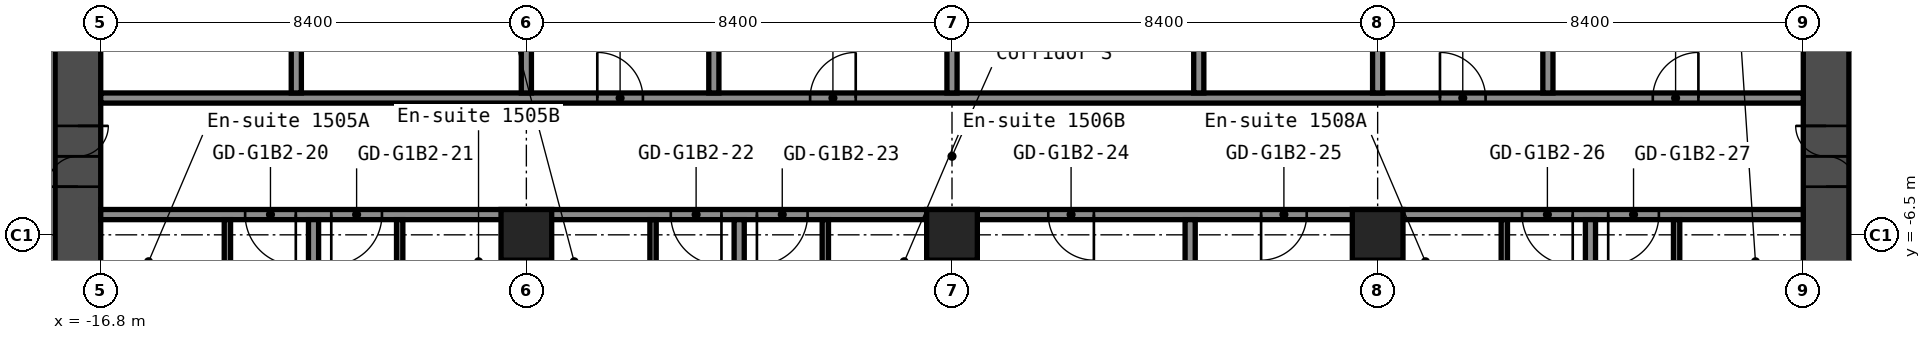
"""IFC4 building model, lengths in metres.
Left out: names, types, materials, properties, quantities, classifications, styles, units other than length and angle.
Written with IfcOpenShell. Run it as: python <this file> out.ifc"""

import sys

from ifc_helpers import new_model, si_unit, direction, frame, frame_2d, origin, origin_2d, place, context, subcontext, project, spatial, rectangle, hollow_rectangle, extrude, element, fill, save


model = new_model("IFC4")
c1 = context("Model", 3, precision=1e-05, world=origin(), true_north=direction((0.0, 1.0)))
c2 = subcontext(c1, "Body", "Model", "MODEL_VIEW")
j1 = project(units=[si_unit("LENGTHUNIT", "METRE"), si_unit("PLANEANGLEUNIT", "RADIAN")], contexts=[c1])
p1 = place(None, origin())
s1 = spatial("IfcSite", under=j1, at=p1, CompositionType="ELEMENT")
p2 = place(p1, origin())
s2 = spatial("IfcBuilding", under=s1, at=p2, CompositionType="ELEMENT")
p3 = place(p2, frame((0.0, 0.0, 55.0)))
s3 = spatial("IfcBuildingStorey", under=s2, at=p3, CompositionType="ELEMENT", Elevation=55.0)
for number, where, z_axis, x_axis in (
    (1, (-8.4, -6.5, 0.0), (0.0, 0.0, 1.0), (1.0, 0.0, 0.0)),
    (2, (0.0, -6.5, 0.0), (0.0, 0.0, 1.0), (1.0, 0.0, 0.0)),
    (3, (8.4, -6.5, 0.0), (0.0, 0.0, 1.0), (1.0, 0.0, 0.0)),
):
    element("IfcColumn", number, at=place(p3, frame(where, z_axis=z_axis, x_axis=x_axis)), inside=s3, PredefinedType="COLUMN", context=c2, shape_type="SweptSolid", body=[
        extrude(hollow_rectangle(XDim=1.0, YDim=1.0, WallThickness=0.04, at=origin_2d()), origin(), (0.0, 0.0, 1.0), 2.8),
    ])
p4 = place(p3, frame((-17.25, -8.4, 0.0), z_axis=(0.0, 0.0, 1.0), x_axis=(0.0, 1.0, 0.0)))
e4 = element("IfcWall", 4, at=p4, inside=s3, PredefinedType="SHEAR", context=c2, shape_type="SweptSolid", body=[
    extrude(rectangle(XDim=16.8, YDim=0.9, at=frame_2d((8.4, 0.0))), origin(), (0.0, 0.0, 1.0), 2.8),
])
p5 = place(p4, frame((12.75, 0.0, 0.0)))
e5 = element("IfcOpeningElement", 5, at=p5, cuts=e4, PredefinedType="OPENING", context=c2, shape_type="SweptSolid", body=[
    extrude(rectangle(XDim=1.2, YDim=2.1, at=frame_2d((0.6, 1.05))), frame((0.0, 0.46, 0.0), z_axis=(0.0, -1.0, 0.0), x_axis=(1.0, 0.0, 0.0)), (0.0, 0.0, 1.0), 0.92),
])
p6 = place(p4, frame((2.85, 0.0, 0.0)))
e6 = element("IfcOpeningElement", 6, at=p6, cuts=e4, PredefinedType="OPENING", context=c2, shape_type="SweptSolid", body=[
    extrude(rectangle(XDim=1.2, YDim=2.1, at=frame_2d((0.6, 1.05))), frame((0.0, 0.46, 0.0), z_axis=(0.0, -1.0, 0.0), x_axis=(1.0, 0.0, 0.0)), (0.0, 0.0, 1.0), 0.92),
])
p7 = place(p3, frame((17.25, -8.4, 0.0), z_axis=(0.0, 0.0, 1.0), x_axis=(0.0, 1.0, 0.0)))
e7 = element("IfcWall", 7, at=p7, inside=s3, PredefinedType="SHEAR", context=c2, shape_type="SweptSolid", body=[
    extrude(rectangle(XDim=16.8, YDim=0.9, at=frame_2d((8.4, 0.0))), origin(), (0.0, 0.0, 1.0), 2.8),
])
p8 = place(p7, frame((12.75, 0.0, 0.0)))
e8 = element("IfcOpeningElement", 8, at=p8, cuts=e7, PredefinedType="OPENING", context=c2, shape_type="SweptSolid", body=[
    extrude(rectangle(XDim=1.2, YDim=2.1, at=frame_2d((0.6, 1.05))), frame((0.0, 0.46, 0.0), z_axis=(0.0, -1.0, 0.0), x_axis=(1.0, 0.0, 0.0)), (0.0, 0.0, 1.0), 0.92),
])
p9 = place(p7, frame((2.85, 0.0, 0.0)))
e9 = element("IfcOpeningElement", 9, at=p9, cuts=e7, PredefinedType="OPENING", context=c2, shape_type="SweptSolid", body=[
    extrude(rectangle(XDim=1.2, YDim=2.1, at=frame_2d((0.6, 1.05))), frame((0.0, 0.46, 0.0), z_axis=(0.0, -1.0, 0.0), x_axis=(1.0, 0.0, 0.0)), (0.0, 0.0, 1.0), 0.92),
])
p10 = place(p3, frame((-16.8, -6.1, 0.0), z_axis=(0.0, 0.0, 1.0), x_axis=(1.0, 0.0, 0.0)))
e10 = element("IfcWall", 10, at=p10, inside=s3, PredefinedType="PARTITIONING", context=c2, shape_type="SweptSolid", body=[
    extrude(rectangle(XDim=33.6, YDim=0.2, at=frame_2d((16.8, 0.0))), origin(), (0.0, 0.0, 1.0), 2.8),
])
p11 = place(p10, frame((2.85, 0.0, 0.0)))
e11 = element("IfcOpeningElement", 11, at=p11, cuts=e10, PredefinedType="OPENING", context=c2, shape_type="SweptSolid", body=[
    extrude(rectangle(XDim=1.0, YDim=2.1, at=frame_2d((0.5, 1.05))), frame((0.0, 0.11, 0.0), z_axis=(0.0, -1.0, 0.0), x_axis=(1.0, 0.0, 0.0)), (0.0, 0.0, 1.0), 0.22),
])
p12 = place(p10, frame((4.55, 0.0, 0.0)))
e12 = element("IfcOpeningElement", 12, at=p12, cuts=e10, PredefinedType="OPENING", context=c2, shape_type="SweptSolid", body=[
    extrude(rectangle(XDim=1.0, YDim=2.1, at=frame_2d((0.5, 1.05))), frame((0.0, 0.11, 0.0), z_axis=(0.0, -1.0, 0.0), x_axis=(1.0, 0.0, 0.0)), (0.0, 0.0, 1.0), 0.22),
])
p13 = place(p10, frame((11.25, 0.0, 0.0)))
e13 = element("IfcOpeningElement", 13, at=p13, cuts=e10, PredefinedType="OPENING", context=c2, shape_type="SweptSolid", body=[
    extrude(rectangle(XDim=1.0, YDim=2.1, at=frame_2d((0.5, 1.05))), frame((0.0, 0.11, 0.0), z_axis=(0.0, -1.0, 0.0), x_axis=(1.0, 0.0, 0.0)), (0.0, 0.0, 1.0), 0.22),
])
p14 = place(p10, frame((12.95, 0.0, 0.0)))
e14 = element("IfcOpeningElement", 14, at=p14, cuts=e10, PredefinedType="OPENING", context=c2, shape_type="SweptSolid", body=[
    extrude(rectangle(XDim=1.0, YDim=2.1, at=frame_2d((0.5, 1.05))), frame((0.0, 0.11, 0.0), z_axis=(0.0, -1.0, 0.0), x_axis=(1.0, 0.0, 0.0)), (0.0, 0.0, 1.0), 0.22),
])
p15 = place(p10, frame((18.7, 0.0, 0.0)))
e15 = element("IfcOpeningElement", 15, at=p15, cuts=e10, PredefinedType="OPENING", context=c2, shape_type="SweptSolid", body=[
    extrude(rectangle(XDim=0.9, YDim=2.1, at=frame_2d((0.45, 1.05))), frame((0.0, 0.11, 0.0), z_axis=(0.0, -1.0, 0.0), x_axis=(1.0, 0.0, 0.0)), (0.0, 0.0, 1.0), 0.22),
])
p16 = place(p10, frame((22.9, 0.0, 0.0)))
e16 = element("IfcOpeningElement", 16, at=p16, cuts=e10, PredefinedType="OPENING", context=c2, shape_type="SweptSolid", body=[
    extrude(rectangle(XDim=0.9, YDim=2.1, at=frame_2d((0.45, 1.05))), frame((0.0, 0.11, 0.0), z_axis=(0.0, -1.0, 0.0), x_axis=(1.0, 0.0, 0.0)), (0.0, 0.0, 1.0), 0.22),
])
p17 = place(p10, frame((28.05, 0.0, 0.0)))
e17 = element("IfcOpeningElement", 17, at=p17, cuts=e10, PredefinedType="OPENING", context=c2, shape_type="SweptSolid", body=[
    extrude(rectangle(XDim=1.0, YDim=2.1, at=frame_2d((0.5, 1.05))), frame((0.0, 0.11, 0.0), z_axis=(0.0, -1.0, 0.0), x_axis=(1.0, 0.0, 0.0)), (0.0, 0.0, 1.0), 0.22),
])
p18 = place(p10, frame((29.75, 0.0, 0.0)))
e18 = element("IfcOpeningElement", 18, at=p18, cuts=e10, PredefinedType="OPENING", context=c2, shape_type="SweptSolid", body=[
    extrude(rectangle(XDim=1.0, YDim=2.1, at=frame_2d((0.5, 1.05))), frame((0.0, 0.11, 0.0), z_axis=(0.0, -1.0, 0.0), x_axis=(1.0, 0.0, 0.0)), (0.0, 0.0, 1.0), 0.22),
])
p19 = place(p3, frame((-16.8, -3.8, 0.0), z_axis=(0.0, 0.0, 1.0), x_axis=(1.0, 0.0, 0.0)))
e19 = element("IfcWall", 19, at=p19, inside=s3, PredefinedType="PARTITIONING", context=c2, shape_type="SweptSolid", body=[
    extrude(rectangle(XDim=33.6, YDim=0.2, at=frame_2d((16.8, 0.0))), origin(), (0.0, 0.0, 1.0), 2.8),
])
p20 = place(p19, frame((9.8, 0.0, 0.0)))
e20 = element("IfcOpeningElement", 20, at=p20, cuts=e19, PredefinedType="OPENING", context=c2, shape_type="SweptSolid", body=[
    extrude(rectangle(XDim=0.9, YDim=2.1, at=frame_2d((0.45, 1.05))), frame((0.0, 0.11, 0.0), z_axis=(0.0, -1.0, 0.0), x_axis=(1.0, 0.0, 0.0)), (0.0, 0.0, 1.0), 0.22),
])
p21 = place(p19, frame((14.0, 0.0, 0.0)))
e21 = element("IfcOpeningElement", 21, at=p21, cuts=e19, PredefinedType="OPENING", context=c2, shape_type="SweptSolid", body=[
    extrude(rectangle(XDim=0.9, YDim=2.1, at=frame_2d((0.45, 1.05))), frame((0.0, 0.11, 0.0), z_axis=(0.0, -1.0, 0.0), x_axis=(1.0, 0.0, 0.0)), (0.0, 0.0, 1.0), 0.22),
])
p22 = place(p19, frame((26.43, 0.0, 0.0)))
e22 = element("IfcOpeningElement", 22, at=p22, cuts=e19, PredefinedType="OPENING", context=c2, shape_type="SweptSolid", body=[
    extrude(rectangle(XDim=0.9, YDim=2.1, at=frame_2d((0.45, 1.05))), frame((0.0, 0.11, 0.0), z_axis=(0.0, -1.0, 0.0), x_axis=(1.0, 0.0, 0.0)), (0.0, 0.0, 1.0), 0.22),
])
p23 = place(p19, frame((30.63, 0.0, 0.0)))
e23 = element("IfcOpeningElement", 23, at=p23, cuts=e19, PredefinedType="OPENING", context=c2, shape_type="SweptSolid", body=[
    extrude(rectangle(XDim=0.9, YDim=2.1, at=frame_2d((0.45, 1.05))), frame((0.0, 0.11, 0.0), z_axis=(0.0, -1.0, 0.0), x_axis=(1.0, 0.0, 0.0)), (0.0, 0.0, 1.0), 0.22),
])
p24 = place(p3, frame((-14.3, -9.1, 0.0), z_axis=(0.0, 0.0, 1.0), x_axis=(0.0, 1.0, 0.0)))
e24 = element("IfcWall", 24, at=p24, inside=s3, PredefinedType="PARTITIONING", context=c2, shape_type="SweptSolid", body=[
    extrude(rectangle(XDim=2.9, YDim=0.125, at=frame_2d((1.45, 0.0))), origin(), (0.0, 0.0, 1.0), 2.8),
])
p25 = place(p24, frame((0.6, 0.0, 0.0)))
e25 = element("IfcOpeningElement", 25, at=p25, cuts=e24, PredefinedType="OPENING", context=c2, shape_type="SweptSolid", body=[
    extrude(rectangle(XDim=0.8, YDim=2.1, at=frame_2d((0.4, 1.05))), frame((0.0, 0.073, 0.0), z_axis=(0.0, -1.0, 0.0), x_axis=(1.0, 0.0, 0.0)), (0.0, 0.0, 1.0), 0.145),
])
p26 = place(p3, frame((-12.94, -3.7, 0.0), z_axis=(0.0, 0.0, 1.0), x_axis=(0.0, 1.0, 0.0)))
e26 = element("IfcWall", 26, at=p26, inside=s3, PredefinedType="PARTITIONING", context=c2, shape_type="SweptSolid", body=[
    extrude(rectangle(XDim=7.4, YDim=0.2, at=frame_2d((3.7, 0.0))), origin(), (0.0, 0.0, 1.0), 2.8),
])
p27 = place(p3, frame((-12.6, -20.3, 0.0), z_axis=(0.0, 0.0, 1.0), x_axis=(0.0, 1.0, 0.0)))
e27 = element("IfcWall", 27, at=p27, inside=s3, PredefinedType="PARTITIONING", context=c2, shape_type="SweptSolid", body=[
    extrude(rectangle(XDim=14.1, YDim=0.2, at=frame_2d((7.05, 0.0))), origin(), (0.0, 0.0, 1.0), 2.8),
])
p28 = place(p3, frame((-10.9, -9.1, 0.0), z_axis=(0.0, 0.0, 1.0), x_axis=(0.0, 1.0, 0.0)))
e28 = element("IfcWall", 28, at=p28, inside=s3, PredefinedType="PARTITIONING", context=c2, shape_type="SweptSolid", body=[
    extrude(rectangle(XDim=2.9, YDim=0.125, at=frame_2d((1.45, 0.0))), origin(), (0.0, 0.0, 1.0), 2.8),
])
p29 = place(p28, frame((0.6, 0.0, 0.0)))
e29 = element("IfcOpeningElement", 29, at=p29, cuts=e28, PredefinedType="OPENING", context=c2, shape_type="SweptSolid", body=[
    extrude(rectangle(XDim=0.8, YDim=2.1, at=frame_2d((0.4, 1.05))), frame((0.0, 0.073, 0.0), z_axis=(0.0, -1.0, 0.0), x_axis=(1.0, 0.0, 0.0)), (0.0, 0.0, 1.0), 0.145),
])
p30 = place(p3, frame((-8.4, -20.3, 0.0), z_axis=(0.0, 0.0, 1.0), x_axis=(0.0, 1.0, 0.0)))
e30 = element("IfcWall", 30, at=p30, inside=s3, PredefinedType="PARTITIONING", context=c2, shape_type="SweptSolid", body=[
    extrude(rectangle(XDim=13.31, YDim=0.2, at=frame_2d((6.655, 0.0))), origin(), (0.0, 0.0, 1.0), 2.8),
])
p31 = place(p3, frame((-8.4, -3.7, 0.0), z_axis=(0.0, 0.0, 1.0), x_axis=(0.0, 1.0, 0.0)))
e31 = element("IfcWall", 31, at=p31, inside=s3, PredefinedType="PARTITIONING", context=c2, shape_type="SweptSolid", body=[
    extrude(rectangle(XDim=7.4, YDim=0.2, at=frame_2d((3.7, 0.0))), origin(), (0.0, 0.0, 1.0), 2.8),
])
p32 = place(p3, frame((-5.9, -9.1, 0.0), z_axis=(0.0, 0.0, 1.0), x_axis=(0.0, 1.0, 0.0)))
e32 = element("IfcWall", 32, at=p32, inside=s3, PredefinedType="PARTITIONING", context=c2, shape_type="SweptSolid", body=[
    extrude(rectangle(XDim=2.9, YDim=0.125, at=frame_2d((1.45, 0.0))), origin(), (0.0, 0.0, 1.0), 2.8),
])
p33 = place(p32, frame((0.6, 0.0, 0.0)))
e33 = element("IfcOpeningElement", 33, at=p33, cuts=e32, PredefinedType="OPENING", context=c2, shape_type="SweptSolid", body=[
    extrude(rectangle(XDim=0.8, YDim=2.1, at=frame_2d((0.4, 1.05))), frame((0.0, 0.073, 0.0), z_axis=(0.0, -1.0, 0.0), x_axis=(1.0, 0.0, 0.0)), (0.0, 0.0, 1.0), 0.145),
])
p34 = place(p3, frame((-4.7, -3.7, 0.0), z_axis=(0.0, 0.0, 1.0), x_axis=(0.0, 1.0, 0.0)))
e34 = element("IfcWall", 34, at=p34, inside=s3, PredefinedType="PARTITIONING", context=c2, shape_type="SweptSolid", body=[
    extrude(rectangle(XDim=7.4, YDim=0.2, at=frame_2d((3.7, 0.0))), origin(), (0.0, 0.0, 1.0), 2.8),
])
p35 = place(p3, frame((-4.2, -20.3, 0.0), z_axis=(0.0, 0.0, 1.0), x_axis=(0.0, 1.0, 0.0)))
e35 = element("IfcWall", 35, at=p35, inside=s3, PredefinedType="PARTITIONING", context=c2, shape_type="SweptSolid", body=[
    extrude(rectangle(XDim=14.1, YDim=0.2, at=frame_2d((7.05, 0.0))), origin(), (0.0, 0.0, 1.0), 2.8),
])
p36 = place(p3, frame((-2.5, -9.1, 0.0), z_axis=(0.0, 0.0, 1.0), x_axis=(0.0, 1.0, 0.0)))
e36 = element("IfcWall", 36, at=p36, inside=s3, PredefinedType="PARTITIONING", context=c2, shape_type="SweptSolid", body=[
    extrude(rectangle(XDim=2.9, YDim=0.125, at=frame_2d((1.45, 0.0))), origin(), (0.0, 0.0, 1.0), 2.8),
])
p37 = place(p36, frame((0.6, 0.0, 0.0)))
e37 = element("IfcOpeningElement", 37, at=p37, cuts=e36, PredefinedType="OPENING", context=c2, shape_type="SweptSolid", body=[
    extrude(rectangle(XDim=0.8, YDim=2.1, at=frame_2d((0.4, 1.05))), frame((0.0, 0.073, 0.0), z_axis=(0.0, -1.0, 0.0), x_axis=(1.0, 0.0, 0.0)), (0.0, 0.0, 1.0), 0.145),
])
p38 = place(p3, frame((0.0, -20.3, 0.0), z_axis=(0.0, 0.0, 1.0), x_axis=(0.0, 1.0, 0.0)))
e38 = element("IfcWall", 38, at=p38, inside=s3, PredefinedType="PARTITIONING", context=c2, shape_type="SweptSolid", body=[
    extrude(rectangle(XDim=13.31, YDim=0.2, at=frame_2d((6.655, 0.0))), origin(), (0.0, 0.0, 1.0), 2.8),
])
p39 = place(p3, frame((0.0, -3.7, 0.0), z_axis=(0.0, 0.0, 1.0), x_axis=(0.0, 1.0, 0.0)))
e39 = element("IfcWall", 39, at=p39, inside=s3, PredefinedType="PARTITIONING", context=c2, shape_type="SweptSolid", body=[
    extrude(rectangle(XDim=7.4, YDim=0.2, at=frame_2d((3.7, 0.0))), origin(), (0.0, 0.0, 1.0), 2.8),
])
p40 = place(p3, frame((4.7, -20.3, 0.0), z_axis=(0.0, 0.0, 1.0), x_axis=(0.0, 1.0, 0.0)))
e40 = element("IfcWall", 40, at=p40, inside=s3, PredefinedType="PARTITIONING", context=c2, shape_type="SweptSolid", body=[
    extrude(rectangle(XDim=14.1, YDim=0.2, at=frame_2d((7.05, 0.0))), origin(), (0.0, 0.0, 1.0), 2.8),
])
p41 = place(p3, frame((4.87, -3.7, 0.0), z_axis=(0.0, 0.0, 1.0), x_axis=(0.0, 1.0, 0.0)))
e41 = element("IfcWall", 41, at=p41, inside=s3, PredefinedType="PARTITIONING", context=c2, shape_type="SweptSolid", body=[
    extrude(rectangle(XDim=7.4, YDim=0.2, at=frame_2d((3.7, 0.0))), origin(), (0.0, 0.0, 1.0), 2.8),
])
p42 = place(p3, frame((8.4, -20.3, 0.0), z_axis=(0.0, 0.0, 1.0), x_axis=(0.0, 1.0, 0.0)))
e42 = element("IfcWall", 42, at=p42, inside=s3, PredefinedType="PARTITIONING", context=c2, shape_type="SweptSolid", body=[
    extrude(rectangle(XDim=13.31, YDim=0.2, at=frame_2d((6.655, 0.0))), origin(), (0.0, 0.0, 1.0), 2.8),
])
p43 = place(p3, frame((8.4, -3.7, 0.0), z_axis=(0.0, 0.0, 1.0), x_axis=(0.0, 1.0, 0.0)))
e43 = element("IfcWall", 43, at=p43, inside=s3, PredefinedType="PARTITIONING", context=c2, shape_type="SweptSolid", body=[
    extrude(rectangle(XDim=7.4, YDim=0.2, at=frame_2d((3.7, 0.0))), origin(), (0.0, 0.0, 1.0), 2.8),
])
p44 = place(p3, frame((10.9, -9.1, 0.0), z_axis=(0.0, 0.0, 1.0), x_axis=(0.0, 1.0, 0.0)))
e44 = element("IfcWall", 44, at=p44, inside=s3, PredefinedType="PARTITIONING", context=c2, shape_type="SweptSolid", body=[
    extrude(rectangle(XDim=2.9, YDim=0.125, at=frame_2d((1.45, 0.0))), origin(), (0.0, 0.0, 1.0), 2.8),
])
p45 = place(p44, frame((0.6, 0.0, 0.0)))
e45 = element("IfcOpeningElement", 45, at=p45, cuts=e44, PredefinedType="OPENING", context=c2, shape_type="SweptSolid", body=[
    extrude(rectangle(XDim=0.8, YDim=2.1, at=frame_2d((0.4, 1.05))), frame((0.0, 0.073, 0.0), z_axis=(0.0, -1.0, 0.0), x_axis=(1.0, 0.0, 0.0)), (0.0, 0.0, 1.0), 0.145),
])
p46 = place(p3, frame((11.76, -3.7, 0.0), z_axis=(0.0, 0.0, 1.0), x_axis=(0.0, 1.0, 0.0)))
e46 = element("IfcWall", 46, at=p46, inside=s3, PredefinedType="PARTITIONING", context=c2, shape_type="SweptSolid", body=[
    extrude(rectangle(XDim=7.4, YDim=0.2, at=frame_2d((3.7, 0.0))), origin(), (0.0, 0.0, 1.0), 2.8),
])
p47 = place(p3, frame((12.6, -20.3, 0.0), z_axis=(0.0, 0.0, 1.0), x_axis=(0.0, 1.0, 0.0)))
e47 = element("IfcWall", 47, at=p47, inside=s3, PredefinedType="PARTITIONING", context=c2, shape_type="SweptSolid", body=[
    extrude(rectangle(XDim=14.1, YDim=0.2, at=frame_2d((7.05, 0.0))), origin(), (0.0, 0.0, 1.0), 2.8),
])
p48 = place(p3, frame((14.3, -9.1, 0.0), z_axis=(0.0, 0.0, 1.0), x_axis=(0.0, 1.0, 0.0)))
e48 = element("IfcWall", 48, at=p48, inside=s3, PredefinedType="PARTITIONING", context=c2, shape_type="SweptSolid", body=[
    extrude(rectangle(XDim=2.9, YDim=0.125, at=frame_2d((1.45, 0.0))), origin(), (0.0, 0.0, 1.0), 2.8),
])
p49 = place(p48, frame((0.6, 0.0, 0.0)))
e49 = element("IfcOpeningElement", 49, at=p49, cuts=e48, PredefinedType="OPENING", context=c2, shape_type="SweptSolid", body=[
    extrude(rectangle(XDim=0.8, YDim=2.1, at=frame_2d((0.4, 1.05))), frame((0.0, 0.073, 0.0), z_axis=(0.0, -1.0, 0.0), x_axis=(1.0, 0.0, 0.0)), (0.0, 0.0, 1.0), 0.145),
])
p50 = place(p6, origin())
e50 = element("IfcDoor", 50, at=p50, inside=s3, OperationType="DOUBLE_DOOR_SINGLE_SWING", PredefinedType="DOOR", context=c2, shape_type="SweptSolid", body=[
    extrude(rectangle(XDim=1.2, YDim=2.1, at=frame_2d((0.6, 1.05))), frame((0.0, 0.025, 0.0), z_axis=(0.0, -1.0, 0.0), x_axis=(1.0, 0.0, 0.0)), (0.0, 0.0, 1.0), 0.05),
])
fill(e6, e50)
p51 = place(p9, origin())
e51 = element("IfcDoor", 51, at=p51, inside=s3, OperationType="DOUBLE_DOOR_SINGLE_SWING", PredefinedType="DOOR", context=c2, shape_type="SweptSolid", body=[
    extrude(rectangle(XDim=1.2, YDim=2.1, at=frame_2d((0.6, 1.05))), frame((0.0, 0.025, 0.0), z_axis=(0.0, -1.0, 0.0), x_axis=(1.0, 0.0, 0.0)), (0.0, 0.0, 1.0), 0.05),
])
fill(e9, e51)
p52 = place(p11, origin())
e52 = element("IfcDoor", 52, at=p52, inside=s3, OperationType="SINGLE_SWING_RIGHT", PredefinedType="DOOR", context=c2, shape_type="SweptSolid", body=[
    extrude(rectangle(XDim=1.0, YDim=2.1, at=frame_2d((0.5, 1.05))), frame((0.0, 0.025, 0.0), z_axis=(0.0, -1.0, 0.0), x_axis=(1.0, 0.0, 0.0)), (0.0, 0.0, 1.0), 0.05),
])
fill(e11, e52)
p53 = place(p12, origin())
e53 = element("IfcDoor", 53, at=p53, inside=s3, OperationType="SINGLE_SWING_LEFT", PredefinedType="DOOR", context=c2, shape_type="SweptSolid", body=[
    extrude(rectangle(XDim=1.0, YDim=2.1, at=frame_2d((0.5, 1.05))), frame((0.0, 0.025, 0.0), z_axis=(0.0, -1.0, 0.0), x_axis=(1.0, 0.0, 0.0)), (0.0, 0.0, 1.0), 0.05),
])
fill(e12, e53)
p54 = place(p13, origin())
e54 = element("IfcDoor", 54, at=p54, inside=s3, OperationType="SINGLE_SWING_RIGHT", PredefinedType="DOOR", context=c2, shape_type="SweptSolid", body=[
    extrude(rectangle(XDim=1.0, YDim=2.1, at=frame_2d((0.5, 1.05))), frame((0.0, 0.025, 0.0), z_axis=(0.0, -1.0, 0.0), x_axis=(1.0, 0.0, 0.0)), (0.0, 0.0, 1.0), 0.05),
])
fill(e13, e54)
p55 = place(p14, origin())
e55 = element("IfcDoor", 55, at=p55, inside=s3, OperationType="SINGLE_SWING_LEFT", PredefinedType="DOOR", context=c2, shape_type="SweptSolid", body=[
    extrude(rectangle(XDim=1.0, YDim=2.1, at=frame_2d((0.5, 1.05))), frame((0.0, 0.025, 0.0), z_axis=(0.0, -1.0, 0.0), x_axis=(1.0, 0.0, 0.0)), (0.0, 0.0, 1.0), 0.05),
])
fill(e14, e55)
p56 = place(p15, origin())
e56 = element("IfcDoor", 56, at=p56, inside=s3, OperationType="SINGLE_SWING_RIGHT", PredefinedType="DOOR", context=c2, shape_type="SweptSolid", body=[
    extrude(rectangle(XDim=0.9, YDim=2.1, at=frame_2d((0.45, 1.05))), frame((0.0, 0.025, 0.0), z_axis=(0.0, -1.0, 0.0), x_axis=(1.0, 0.0, 0.0)), (0.0, 0.0, 1.0), 0.05),
])
fill(e15, e56)
p57 = place(p16, origin())
e57 = element("IfcDoor", 57, at=p57, inside=s3, OperationType="SINGLE_SWING_LEFT", PredefinedType="DOOR", context=c2, shape_type="SweptSolid", body=[
    extrude(rectangle(XDim=0.9, YDim=2.1, at=frame_2d((0.45, 1.05))), frame((0.0, 0.025, 0.0), z_axis=(0.0, -1.0, 0.0), x_axis=(1.0, 0.0, 0.0)), (0.0, 0.0, 1.0), 0.05),
])
fill(e16, e57)
p58 = place(p17, origin())
e58 = element("IfcDoor", 58, at=p58, inside=s3, OperationType="SINGLE_SWING_RIGHT", PredefinedType="DOOR", context=c2, shape_type="SweptSolid", body=[
    extrude(rectangle(XDim=1.0, YDim=2.1, at=frame_2d((0.5, 1.05))), frame((0.0, 0.025, 0.0), z_axis=(0.0, -1.0, 0.0), x_axis=(1.0, 0.0, 0.0)), (0.0, 0.0, 1.0), 0.05),
])
fill(e17, e58)
p59 = place(p18, origin())
e59 = element("IfcDoor", 59, at=p59, inside=s3, OperationType="SINGLE_SWING_LEFT", PredefinedType="DOOR", context=c2, shape_type="SweptSolid", body=[
    extrude(rectangle(XDim=1.0, YDim=2.1, at=frame_2d((0.5, 1.05))), frame((0.0, 0.025, 0.0), z_axis=(0.0, -1.0, 0.0), x_axis=(1.0, 0.0, 0.0)), (0.0, 0.0, 1.0), 0.05),
])
fill(e18, e59)
p60 = place(p20, origin())
e60 = element("IfcDoor", 60, at=p60, inside=s3, OperationType="SINGLE_SWING_RIGHT", PredefinedType="DOOR", context=c2, shape_type="SweptSolid", body=[
    extrude(rectangle(XDim=0.9, YDim=2.1, at=frame_2d((0.45, 1.05))), frame((0.0, 0.025, 0.0), z_axis=(0.0, -1.0, 0.0), x_axis=(1.0, 0.0, 0.0)), (0.0, 0.0, 1.0), 0.05),
])
fill(e20, e60)
p61 = place(p21, origin())
e61 = element("IfcDoor", 61, at=p61, inside=s3, OperationType="SINGLE_SWING_LEFT", PredefinedType="DOOR", context=c2, shape_type="SweptSolid", body=[
    extrude(rectangle(XDim=0.9, YDim=2.1, at=frame_2d((0.45, 1.05))), frame((0.0, 0.025, 0.0), z_axis=(0.0, -1.0, 0.0), x_axis=(1.0, 0.0, 0.0)), (0.0, 0.0, 1.0), 0.05),
])
fill(e21, e61)
p62 = place(p22, origin())
e62 = element("IfcDoor", 62, at=p62, inside=s3, OperationType="SINGLE_SWING_RIGHT", PredefinedType="DOOR", context=c2, shape_type="SweptSolid", body=[
    extrude(rectangle(XDim=0.9, YDim=2.1, at=frame_2d((0.45, 1.05))), frame((0.0, 0.025, 0.0), z_axis=(0.0, -1.0, 0.0), x_axis=(1.0, 0.0, 0.0)), (0.0, 0.0, 1.0), 0.05),
])
fill(e22, e62)
p63 = place(p23, origin())
e63 = element("IfcDoor", 63, at=p63, inside=s3, OperationType="SINGLE_SWING_LEFT", PredefinedType="DOOR", context=c2, shape_type="SweptSolid", body=[
    extrude(rectangle(XDim=0.9, YDim=2.1, at=frame_2d((0.45, 1.05))), frame((0.0, 0.025, 0.0), z_axis=(0.0, -1.0, 0.0), x_axis=(1.0, 0.0, 0.0)), (0.0, 0.0, 1.0), 0.05),
])
fill(e23, e63)
save(model, sys.argv[1])
